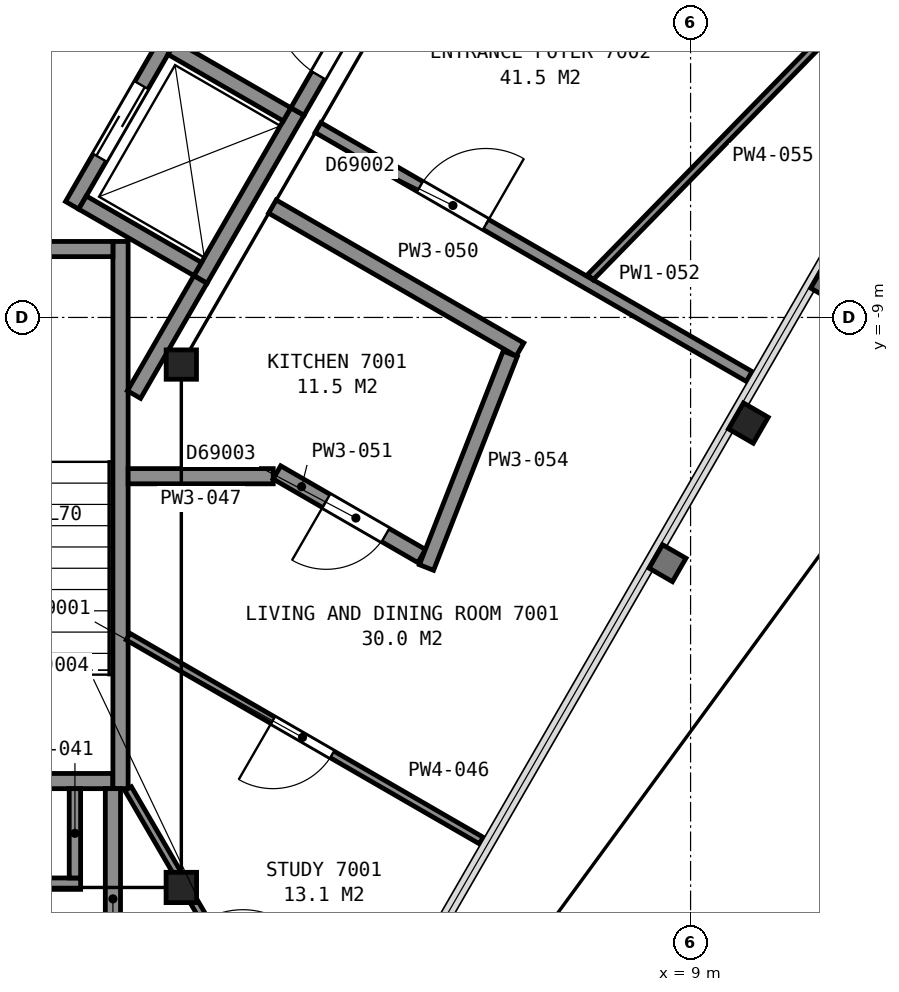
"""IFC4 building model, lengths in metres.
Left out: names, types, materials, properties, quantities, classifications, styles, units other than length and angle.
Written with IfcOpenShell. Run it as: python <this file> out.ifc"""

import sys

from ifc_helpers import new_model, si_unit, direction, frame, frame_2d, origin, origin_2d, place, context, subcontext, project, spatial, rectangle, i_section, extrude, element, fill, save


model = new_model("IFC4")
c1 = context("Model", 3, precision=1e-05, world=origin(), true_north=direction((0.0, 1.0)))
c2 = subcontext(c1, "Body", "Model", "MODEL_VIEW")
j1 = project(units=[si_unit("LENGTHUNIT", "METRE"), si_unit("PLANEANGLEUNIT", "RADIAN")], contexts=[c1])
p1 = place(None, origin())
s1 = spatial("IfcSite", under=j1, at=p1, CompositionType="ELEMENT")
p2 = place(p1, origin())
s2 = spatial("IfcBuilding", under=s1, at=p2, CompositionType="ELEMENT")
p3 = place(p2, frame((0.0, 0.0, 278.8)))
s3 = spatial("IfcBuildingStorey", under=s2, at=p3, CompositionType="ELEMENT", Elevation=278.8)
p4 = place(p3, frame((9.76, -10.39, 0.0), z_axis=(0.0, 0.0, 1.0), x_axis=(-0.5, -0.866025403784, 0.0)))
e1 = element("IfcColumn", 1, at=p4, inside=s3, PredefinedType="COLUMN", context=c2, shape_type="SweptSolid", body=[
    extrude(i_section(OverallWidth=0.394, OverallDepth=0.376, WebThickness=0.017, FlangeThickness=0.028, FilletRadius=0.015, at=origin_2d()), origin(), (0.0, 0.0, 1.0), 3.7),
])
p5 = place(p3, frame((2.3, -16.5, 0.0), z_axis=(0.0, 0.0, 1.0), x_axis=(-1.0, 0.0, 0.0)))
e2 = element("IfcColumn", 2, at=p5, inside=s3, PredefinedType="COLUMN", context=c2, shape_type="SweptSolid", body=[
    extrude(i_section(OverallWidth=0.401, OverallDepth=0.399, WebThickness=0.025, FlangeThickness=0.04, FilletRadius=0.015, at=origin_2d()), origin(), (0.0, 0.0, 1.0), 3.7),
])
p6 = place(p3, frame((2.3, -9.62, 0.0), z_axis=(0.0, 0.0, 1.0), x_axis=(1.0, 0.0, 0.0)))
e3 = element("IfcColumn", 3, at=p6, inside=s3, PredefinedType="COLUMN", context=c2, shape_type="SweptSolid", body=[
    extrude(i_section(OverallWidth=0.399, OverallDepth=0.386, WebThickness=0.021, FlangeThickness=0.033, FilletRadius=0.015, at=origin_2d()), origin(), (0.0, 0.0, 1.0), 3.7),
])
p7 = place(p3, frame((-1.4, -15.1, 0.0), z_axis=(0.0, 0.0, 1.0), x_axis=(1.0, 0.0, 0.0)))
e4 = element("IfcWall", 4, at=p7, inside=s3, PredefinedType="PARTITIONING", context=c2, shape_type="SweptSolid", body=[
    extrude(rectangle(XDim=2.8, YDim=0.2, at=frame_2d((1.4, 0.0))), origin(), (0.0, 0.0, 1.0), 3.45),
])
p8 = place(p7, frame((0.85, 0.0, 0.0)))
e5 = element("IfcOpeningElement", 5, at=p8, cuts=e4, PredefinedType="OPENING", context=c2, shape_type="SweptSolid", body=[
    extrude(rectangle(XDim=1.1, YDim=2.1, at=frame_2d((0.55, 1.05))), frame((0.0, 0.11, 0.0), z_axis=(0.0, -1.0, 0.0), x_axis=(1.0, 0.0, 0.0)), (0.0, 0.0, 1.0), 0.22),
])
p9 = place(p3, frame((1.5, -8.0, 0.0), z_axis=(0.0, 0.0, 1.0), x_axis=(0.0, -1.0, 0.0)))
e6 = element("IfcWall", 6, at=p9, inside=s3, PredefinedType="PARTITIONING", context=c2, shape_type="SweptSolid", body=[
    extrude(rectangle(XDim=7.2, YDim=0.2, at=frame_2d((3.6, 0.0))), origin(), (0.0, 0.0, 1.0), 3.45),
])
p10 = place(p3, frame((-1.4, -8.1, 0.0), z_axis=(0.0, 0.0, 1.0), x_axis=(1.0, 0.0, 0.0)))
e7 = element("IfcWall", 7, at=p10, inside=s3, PredefinedType="PARTITIONING", context=c2, shape_type="SweptSolid", body=[
    extrude(rectangle(XDim=2.8, YDim=0.2, at=frame_2d((1.4, 0.0))), origin(), (0.0, 0.0, 1.0), 3.45),
])
p11 = place(p3, frame((2.552, -8.5, 0.0), z_axis=(0.0, 0.0, 1.0), x_axis=(0.499990435942, 0.866030925526, 0.0)))
e8 = element("IfcWall", 8, at=p11, inside=s3, PredefinedType="PARTITIONING", context=c2, shape_type="SweptSolid", body=[
    extrude(rectangle(XDim=2.55, YDim=0.2, at=frame_2d((1.275, 0.0))), origin(), (0.0, 0.0, 1.0), 3.7),
])
p12 = place(p3, frame((0.863, -7.525, 0.0), z_axis=(0.0, 0.0, 1.0), x_axis=(0.499990435942, 0.866030925526, 0.0)))
e9 = element("IfcWall", 9, at=p12, inside=s3, PredefinedType="PARTITIONING", context=c2, shape_type="SweptSolid", body=[
    extrude(rectangle(XDim=2.55, YDim=0.2, at=frame_2d((1.275, 0.0))), origin(), (0.0, 0.0, 1.0), 3.7),
])
p13 = place(p12, frame((0.725, 0.0, 0.0)))
e10 = element("IfcOpeningElement", 10, at=p13, cuts=e9, PredefinedType="OPENING", context=c2, shape_type="SweptSolid", body=[
    extrude(rectangle(XDim=1.1, YDim=2.1, at=frame_2d((0.55, 1.05))), frame((0.0, 0.11, 0.0), z_axis=(0.0, -1.0, 0.0), x_axis=(1.0, 0.0, 0.0)), (0.0, 0.0, 1.0), 0.22),
])
for number, where, z_axis, x_axis in (
    (11, (3.69, -6.328, 0.0), (0.0, 0.0, 1.0), (-0.866, 0.5, 0.0)),
    (12, (2.515, -8.363, 0.0), (0.0, 0.0, 1.0), (-0.866, 0.5, 0.0)),
):
    element("IfcWall", number, at=place(p3, frame(where, z_axis=z_axis, x_axis=x_axis)), inside=s3, PredefinedType="PARTITIONING", context=c2, shape_type="SweptSolid", body=[
        extrude(rectangle(XDim=1.75, YDim=0.2, at=frame_2d((0.875, 0.0))), origin(), (0.0, 0.0, 1.0), 3.7),
    ])
p14 = place(p3, frame((1.677, -10.015, 0.0), z_axis=(0.0, 0.0, 1.0), x_axis=(0.49983532306, 0.866120459187, 0.0)))
e13 = element("IfcWall", 13, at=p14, inside=s3, PredefinedType="PARTITIONING", context=c2, shape_type="SweptSolid", body=[
    extrude(rectangle(XDim=1.748, YDim=0.2, at=frame_2d((0.874, 0.0))), origin(), (0.0, 0.0, 1.0), 3.45),
])
p15 = place(p3, frame((3.828, -6.29, 0.0), z_axis=(0.0, 0.0, 1.0), x_axis=(0.499979739078, 0.866037101117, 0.0)))
e14 = element("IfcWall", 14, at=p15, inside=s3, PredefinedType="PARTITIONING", context=c2, shape_type="SweptSolid", body=[
    extrude(rectangle(XDim=11.363, YDim=0.2, at=frame_2d((5.681, 0.0))), origin(), (0.0, 0.0, 1.0), 3.45),
])
p16 = place(p15, frame((0.55, 0.0, 0.0)))
e15 = element("IfcOpeningElement", 15, at=p16, cuts=e14, PredefinedType="OPENING", context=c2, shape_type="SweptSolid", body=[
    extrude(rectangle(XDim=1.2, YDim=2.1, at=frame_2d((0.6, 1.05))), frame((0.0, 0.11, 0.0), z_axis=(0.0, -1.0, 0.0), x_axis=(1.0, 0.0, 0.0)), (0.0, 0.0, 1.0), 0.22),
])
p17 = place(p3, frame((-1.65, -16.45, 0.0), z_axis=(0.0, 0.0, 1.0), x_axis=(1.0, 0.0, 0.0)))
e16 = element("IfcWall", 16, at=p17, inside=s3, PredefinedType="PARTITIONING", context=c2, shape_type="SweptSolid", body=[
    extrude(rectangle(XDim=2.625, YDim=0.15, at=frame_2d((1.312, 0.0))), origin(), (0.0, 0.0, 1.0), 2.723),
])
p18 = place(p3, frame((0.9, -16.375, 0.0), z_axis=(0.0, 0.0, 1.0), x_axis=(0.0, 1.0, 0.0)))
e17 = element("IfcWall", 17, at=p18, inside=s3, PredefinedType="PARTITIONING", context=c2, shape_type="SweptSolid", body=[
    extrude(rectangle(XDim=1.175, YDim=0.15, at=frame_2d((0.587, 0.0))), origin(), (0.0, 0.0, 1.0), 2.723),
])
p19 = place(p3, frame((1.4, -18.1, 0.0), z_axis=(0.0, 0.0, 1.0), x_axis=(0.0, 1.0, 0.0)))
e18 = element("IfcWall", 18, at=p19, inside=s3, PredefinedType="PARTITIONING", context=c2, shape_type="SweptSolid", body=[
    extrude(rectangle(XDim=2.9, YDim=0.2, at=frame_2d((1.45, 0.0))), origin(), (0.0, 0.0, 1.0), 2.723),
])
p20 = place(p3, frame((4.137, -19.557, 0.0), z_axis=(0.0, 0.0, 1.0), x_axis=(-0.503229634544, 0.864152726615, 0.0)))
e19 = element("IfcWall", 19, at=p20, inside=s3, PredefinedType="PARTITIONING", context=c2, shape_type="SweptSolid", body=[
    extrude(rectangle(XDim=5.042, YDim=0.1, at=frame_2d((2.521, 0.0))), origin(), (0.0, 0.0, 1.0), 2.723),
])
p21 = place(p20, frame((2.042, 0.0, 0.0)))
e20 = element("IfcOpeningElement", 20, at=p21, cuts=e19, PredefinedType="OPENING", context=c2, shape_type="SweptSolid", body=[
    extrude(rectangle(XDim=1.0, YDim=2.1, at=frame_2d((0.5, 1.05))), frame((0.0, 0.06, 0.0), z_axis=(0.0, -1.0, 0.0), x_axis=(1.0, 0.0, 0.0)), (0.0, 0.0, 1.0), 0.12),
])
p22 = place(p3, frame((6.247, -15.883, 0.0), z_axis=(0.0, 0.0, 1.0), x_axis=(-0.866008267802, 0.500029679218, 0.0)))
e21 = element("IfcWall", 21, at=p22, inside=s3, PredefinedType="PARTITIONING", context=c2, shape_type="SweptSolid", body=[
    extrude(rectangle(XDim=5.365, YDim=0.1, at=frame_2d((2.683, 0.0))), origin(), (0.0, 0.0, 1.0), 2.723),
])
p23 = place(p22, frame((2.265, 0.0, 0.0)))
e22 = element("IfcOpeningElement", 22, at=p23, cuts=e21, PredefinedType="OPENING", context=c2, shape_type="SweptSolid", body=[
    extrude(rectangle(XDim=0.9, YDim=2.1, at=frame_2d((0.45, 1.05))), frame((0.0, 0.06, 0.0), z_axis=(0.0, -1.0, 0.0), x_axis=(1.0, 0.0, 0.0)), (0.0, 0.0, 1.0), 0.12),
])
p24 = place(p3, frame((1.6, -11.089, 0.0), z_axis=(0.0, 0.0, 1.0), x_axis=(1.0, 0.0, 0.0)))
e23 = element("IfcWall", 23, at=p24, inside=s3, PredefinedType="PARTITIONING", context=c2, shape_type="SweptSolid", body=[
    extrude(rectangle(XDim=1.909, YDim=0.2, at=frame_2d((0.955, 0.0))), origin(), (0.0, 0.0, 1.0), 2.723),
])
p25 = place(p3, frame((3.498, -7.541, 0.0), z_axis=(0.0, 0.0, 1.0), x_axis=(0.865985624761, -0.500068892961, 0.0)))
e24 = element("IfcWall", 24, at=p25, inside=s3, PredefinedType="PARTITIONING", context=c2, shape_type="SweptSolid", body=[
    extrude(rectangle(XDim=3.762, YDim=0.2, at=frame_2d((1.881, 0.0))), origin(), (0.0, 0.0, 1.0), 2.723),
])
p26 = place(p3, frame((3.557, -11.039, 0.0), z_axis=(0.0, 0.0, 1.0), x_axis=(0.865932364885, -0.500161113487, 0.0)))
e25 = element("IfcWall", 25, at=p26, inside=s3, PredefinedType="PARTITIONING", context=c2, shape_type="SweptSolid", body=[
    extrude(rectangle(XDim=2.2, YDim=0.2, at=frame_2d((1.1, 0.0))), origin(), (0.0, 0.0, 1.0), 2.723),
])
p27 = place(p26, frame((0.75, 0.0, 0.0)))
e26 = element("IfcOpeningElement", 26, at=p27, cuts=e25, PredefinedType="OPENING", context=c2, shape_type="SweptSolid", body=[
    extrude(rectangle(XDim=0.9, YDim=2.1, at=frame_2d((0.45, 1.05))), frame((0.0, 0.11, 0.0), z_axis=(0.0, -1.0, 0.0), x_axis=(1.0, 0.0, 0.0)), (0.0, 0.0, 1.0), 0.22),
])
p28 = place(p3, frame((9.772, -9.777, 0.0), z_axis=(0.0, 0.0, 1.0), x_axis=(-0.866083818164, 0.499898809675, 0.0)))
e27 = element("IfcWall", 27, at=p28, inside=s3, PredefinedType="PARTITIONING", context=c2, shape_type="SweptSolid", body=[
    extrude(rectangle(XDim=6.551, YDim=0.15, at=frame_2d((3.275, 0.0))), origin(), (0.0, 0.0, 1.0), 2.723),
])
p29 = place(p28, frame((4.001, 0.0, 0.0)))
e28 = element("IfcOpeningElement", 28, at=p29, cuts=e27, PredefinedType="OPENING", context=c2, shape_type="SweptSolid", body=[
    extrude(rectangle(XDim=1.0, YDim=2.1, at=frame_2d((0.5, 1.05))), frame((0.0, 0.085, 0.0), z_axis=(0.0, -1.0, 0.0), x_axis=(1.0, 0.0, 0.0)), (0.0, 0.0, 1.0), 0.17),
])
p30 = place(p3, frame((5.526, -12.29, 0.0), z_axis=(0.0, 0.0, 1.0), x_axis=(0.364786545928, 0.931091174864, 0.0)))
e29 = element("IfcWall", 29, at=p30, inside=s3, PredefinedType="PARTITIONING", context=c2, shape_type="SweptSolid", body=[
    extrude(rectangle(XDim=3.019, YDim=0.2, at=frame_2d((1.51, 0.0))), origin(), (0.0, 0.0, 1.0), 2.723),
])
p31 = place(p3, frame((7.682, -8.47, 0.0), z_axis=(0.0, 0.0, 1.0), x_axis=(0.698777378461, 0.715339203002, 0.0)))
e30 = element("IfcWall", 30, at=p31, inside=s3, PredefinedType="PARTITIONING", context=c2, shape_type="SweptSolid", body=[
    extrude(rectangle(XDim=4.452, YDim=0.1, at=frame_2d((2.226, 0.0))), origin(), (0.0, 0.0, 1.0), 2.723),
])
p32 = place(p13, origin())
e31 = element("IfcDoor", 31, at=p32, inside=s3, OperationType="SLIDING_TO_LEFT", PredefinedType="DOOR", context=c2, shape_type="SweptSolid", body=[
    extrude(rectangle(XDim=1.1, YDim=2.1, at=frame_2d((0.55, 1.05))), frame((0.0, 0.025, 0.0), z_axis=(0.0, -1.0, 0.0), x_axis=(1.0, 0.0, 0.0)), (0.0, 0.0, 1.0), 0.05),
])
fill(e10, e31)
p33 = place(p16, origin())
e32 = element("IfcDoor", 32, at=p33, inside=s3, OperationType="SINGLE_SWING_RIGHT", PredefinedType="DOOR", context=c2, shape_type="SweptSolid", body=[
    extrude(rectangle(XDim=1.2, YDim=2.1, at=frame_2d((0.6, 1.05))), frame((0.0, 0.025, 0.0), z_axis=(0.0, -1.0, 0.0), x_axis=(1.0, 0.0, 0.0)), (0.0, 0.0, 1.0), 0.05),
])
fill(e15, e32)
p34 = place(p23, origin())
e33 = element("IfcDoor", 33, at=p34, inside=s3, OperationType="SINGLE_SWING_RIGHT", PredefinedType="DOOR", context=c2, shape_type="SweptSolid", body=[
    extrude(rectangle(XDim=0.9, YDim=2.1, at=frame_2d((0.45, 1.05))), frame((0.0, 0.025, 0.0), z_axis=(0.0, -1.0, 0.0), x_axis=(1.0, 0.0, 0.0)), (0.0, 0.0, 1.0), 0.05),
])
fill(e22, e33)
p35 = place(p27, origin())
e34 = element("IfcDoor", 34, at=p35, inside=s3, OperationType="SINGLE_SWING_LEFT", PredefinedType="DOOR", context=c2, shape_type="SweptSolid", body=[
    extrude(rectangle(XDim=0.9, YDim=2.1, at=frame_2d((0.45, 1.05))), frame((0.0, 0.025, 0.0), z_axis=(0.0, -1.0, 0.0), x_axis=(1.0, 0.0, 0.0)), (0.0, 0.0, 1.0), 0.05),
])
fill(e26, e34)
p36 = place(p29, origin())
e35 = element("IfcDoor", 35, at=p36, inside=s3, OperationType="SINGLE_SWING_LEFT", PredefinedType="DOOR", context=c2, shape_type="SweptSolid", body=[
    extrude(rectangle(XDim=1.0, YDim=2.1, at=frame_2d((0.5, 1.05))), frame((0.0, 0.025, 0.0), z_axis=(0.0, -1.0, 0.0), x_axis=(1.0, 0.0, 0.0)), (0.0, 0.0, 1.0), 0.05),
])
fill(e28, e35)
save(model, sys.argv[1])
